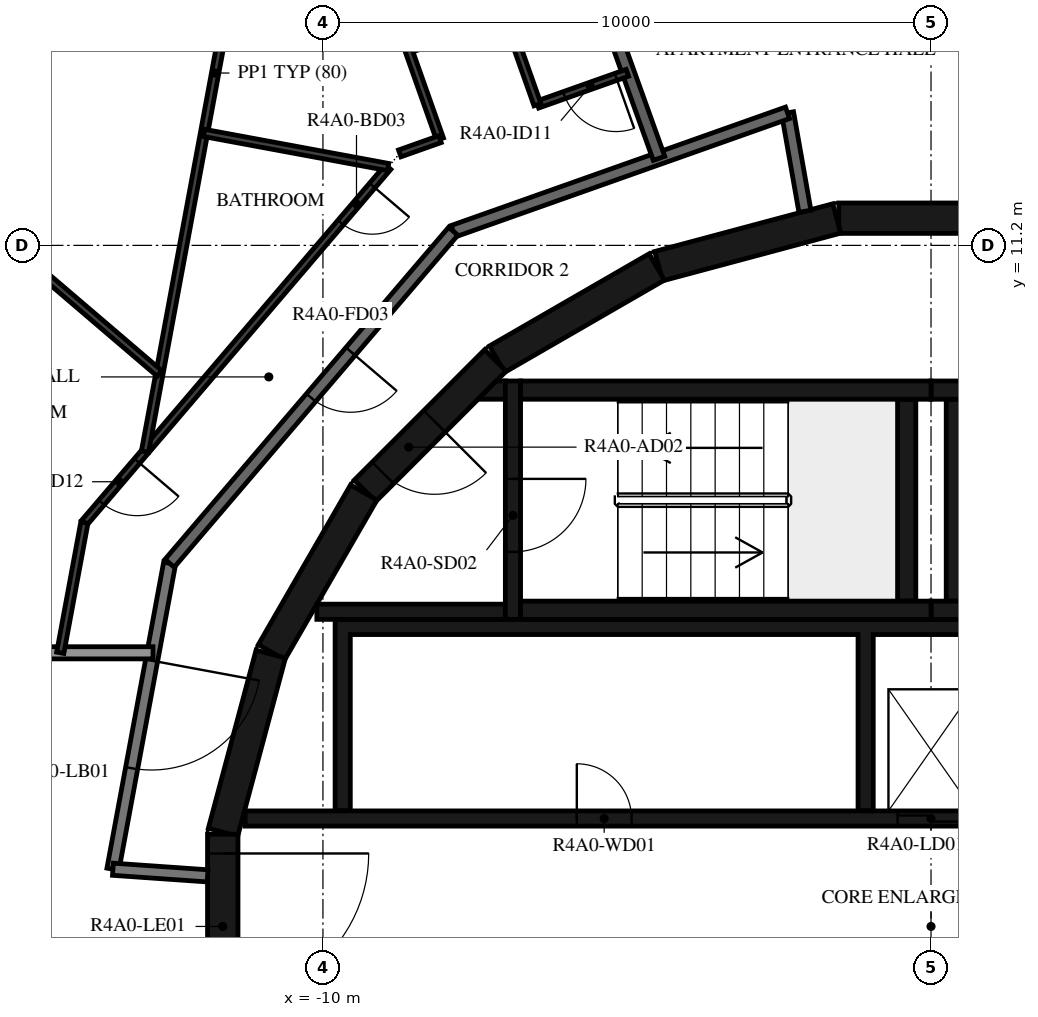
"""IFC4 building model, lengths in metres.
Left out: names, types, materials, properties, quantities, classifications, styles, units other than length and angle.
Written with IfcOpenShell. Run it as: python <this file> out.ifc"""

import sys

from ifc_helpers import new_model, si_unit, direction, frame, frame_2d, origin, place, context, subcontext, project, spatial, polyline, rectangle, outline, extrude, element, fill, save


model = new_model("IFC4")
c1 = context("Model", 3, precision=1e-05, world=origin(), true_north=direction((0.0, 1.0)))
c2 = subcontext(c1, "Body", "Model", "MODEL_VIEW")
j1 = project(units=[si_unit("LENGTHUNIT", "METRE"), si_unit("PLANEANGLEUNIT", "RADIAN")], contexts=[c1])
p1 = place(None, origin())
s1 = spatial("IfcSite", under=j1, at=p1, CompositionType="ELEMENT")
p2 = place(p1, origin())
s2 = spatial("IfcBuilding", under=s1, at=p2, CompositionType="ELEMENT")
p3 = place(p2, frame((0.0, 0.0, 158.7)))
s3 = spatial("IfcBuildingStorey", under=s2, at=p3, CompositionType="ELEMENT", Elevation=158.7)
for number, where, z_axis, x_axis in (
    (1, (1.516, 11.647, 0.0), (0.0, 0.0, 1.0), (-1.0, 0.0, 0.0)),
    (2, (-1.55, 11.643, 0.0), (0.0, 0.0, 1.0), (-0.966, -0.259, 0.0)),
    (3, (-4.51, 10.845, 0.0), (0.0, 0.0, 1.0), (-0.866, -0.5, 0.0)),
):
    element("IfcWall", number, at=place(p3, frame(where, z_axis=z_axis, x_axis=x_axis)), inside=s3, PredefinedType="SHEAR", context=c2, shape_type="SweptSolid", body=[
        extrude(rectangle(XDim=3.033, YDim=0.5, at=frame_2d((1.516, 0.0))), origin(), (0.0, 0.0, 1.0), 3.12),
    ])
p4 = place(p3, frame((-7.164, 9.308, 0.0), z_axis=(0.0, 0.0, 1.0), x_axis=(-0.707106781187, -0.707106781187, 0.0)))
e4 = element("IfcWall", 4, at=p4, inside=s3, PredefinedType="SHEAR", context=c2, shape_type="SweptSolid", body=[
    extrude(rectangle(XDim=3.032, YDim=0.5, at=frame_2d((1.516, 0.0))), origin(), (0.0, 0.0, 1.0), 3.12),
])
p5 = place(p4, frame((1.416, 0.0, 0.0)))
e5 = element("IfcOpeningElement", 5, at=p5, cuts=e4, PredefinedType="OPENING", context=c2, shape_type="SweptSolid", body=[
    extrude(rectangle(XDim=1.2, YDim=2.1, at=frame_2d((0.6, 1.05))), frame((0.0, 0.26, 0.0), z_axis=(0.0, -1.0, 0.0), x_axis=(1.0, 0.0, 0.0)), (0.0, 0.0, 1.0), 0.52),
])
for number, where, z_axis, x_axis in (
    (6, (-9.329, 7.137, 0.0), (0.0, 0.0, 1.0), (-0.5, -0.866, 0.0)),
    (7, (-10.858, 4.479, 0.0), (0.0, 0.0, 1.0), (-0.259, -0.966, 0.0)),
):
    element("IfcWall", number, at=place(p3, frame(where, z_axis=z_axis, x_axis=x_axis)), inside=s3, PredefinedType="SHEAR", context=c2, shape_type="SweptSolid", body=[
        extrude(rectangle(XDim=3.033, YDim=0.5, at=frame_2d((1.516, 0.0))), origin(), (0.0, 0.0, 1.0), 3.12),
    ])
p6 = place(p3, frame((-11.647, 1.516, 0.0), z_axis=(0.0, 0.0, 1.0), x_axis=(0.0, -1.0, 0.0)))
e8 = element("IfcWall", 8, at=p6, inside=s3, PredefinedType="SHEAR", context=c2, shape_type="SweptSolid", body=[
    extrude(rectangle(XDim=3.033, YDim=0.5, at=frame_2d((1.516, 0.0))), origin(), (0.0, 0.0, 1.0), 3.12),
])
p7 = place(p6, frame((0.316, 0.0, 0.0)))
e9 = element("IfcOpeningElement", 9, at=p7, cuts=e8, PredefinedType="OPENING", context=c2, shape_type="SweptSolid", body=[
    extrude(rectangle(XDim=2.4, YDim=2.1, at=frame_2d((1.2, 1.05))), frame((0.0, 0.26, 0.0), z_axis=(0.0, -1.0, 0.0), x_axis=(1.0, 0.0, 0.0)), (0.0, 0.0, 1.0), 0.52),
])
for number, where, z_axis, x_axis in (
    (10, (0.0, 5.2, 0.0), (0.0, 0.0, 1.0), (1.0, 0.0, 0.0)),
    (11, (0.0, 8.82, 0.0), (0.0, 0.0, 1.0), (1.0, 0.0, 0.0)),
):
    element("IfcWall", number, at=place(p3, frame(where, z_axis=z_axis, x_axis=x_axis)), inside=s3, PredefinedType="SHEAR", context=c2, shape_type="SweptSolid", body=[
        extrude(rectangle(XDim=6.75, YDim=0.3, at=frame_2d((3.375, 0.0))), origin(), (0.0, 0.0, 1.0), 3.12),
    ])
p8 = place(p3, frame((0.4, 5.35, 0.0), z_axis=(0.0, 0.0, 1.0), x_axis=(0.0, 1.0, 0.0)))
e12 = element("IfcWall", 12, at=p8, inside=s3, PredefinedType="SHEAR", context=c2, shape_type="SweptSolid", body=[
    extrude(rectangle(XDim=3.32, YDim=0.3, at=frame_2d((1.66, 0.0))), origin(), (0.0, 0.0, 1.0), 3.12),
])
for number, where, z_axis, x_axis in (
    (13, (-6.75, 5.2, 0.0), (0.0, 0.0, 1.0), (1.0, 0.0, 0.0)),
    (14, (-6.75, 8.82, 0.0), (0.0, 0.0, 1.0), (1.0, 0.0, 0.0)),
):
    element("IfcWall", number, at=place(p3, frame(where, z_axis=z_axis, x_axis=x_axis)), inside=s3, PredefinedType="SHEAR", context=c2, shape_type="SweptSolid", body=[
        extrude(rectangle(XDim=6.75, YDim=0.3, at=frame_2d((3.375, 0.0))), origin(), (0.0, 0.0, 1.0), 3.12),
    ])
p9 = place(p3, frame((-0.4, 5.35, 0.0), z_axis=(0.0, 0.0, 1.0), x_axis=(0.0, 1.0, 0.0)))
e15 = element("IfcWall", 15, at=p9, inside=s3, PredefinedType="SHEAR", context=c2, shape_type="SweptSolid", body=[
    extrude(rectangle(XDim=3.32, YDim=0.3, at=frame_2d((1.66, 0.0))), origin(), (0.0, 0.0, 1.0), 3.12),
])
p10 = place(p3, frame((-6.875, 8.97, 0.0), z_axis=(0.0, 0.0, 1.0), x_axis=(0.0, -1.0, 0.0)))
e16 = element("IfcWall", 16, at=p10, inside=s3, PredefinedType="SHEAR", context=c2, shape_type="SweptSolid", body=[
    extrude(rectangle(XDim=3.92, YDim=0.25, at=frame_2d((1.96, 0.0))), origin(), (0.0, 0.0, 1.0), 3.12),
])
p11 = place(p10, frame((1.61, 0.0, 0.0)))
e17 = element("IfcOpeningElement", 17, at=p11, cuts=e16, PredefinedType="OPENING", context=c2, shape_type="SweptSolid", body=[
    extrude(rectangle(XDim=1.2, YDim=2.1, at=frame_2d((0.6, 1.05))), frame((0.0, 0.135, 0.0), z_axis=(0.0, -1.0, 0.0), x_axis=(1.0, 0.0, 0.0)), (0.0, 0.0, 1.0), 0.27),
])
p12 = place(p3, frame((-7.0, 5.175, 0.0), z_axis=(0.0, 0.0, 1.0), x_axis=(-1.0, 0.0, 0.0)))
e18 = element("IfcWall", 18, at=p12, inside=s3, PredefinedType="SHEAR", context=c2, shape_type="SweptSolid", body=[
    extrude(rectangle(XDim=3.1, YDim=0.25, at=frame_2d((1.55, 0.0))), origin(), (0.0, 0.0, 1.0), 3.12),
])
p13 = place(p3, origin())
e19 = element("IfcWall", 19, at=p13, inside=s3, PredefinedType="SHEAR", context=c2, shape_type="SweptSolid", body=[
    extrude(outline(polyline([(-7.148, 8.97), (-7.0, 8.97), (-7.0, 8.67), (-7.448, 8.67), (-7.148, 8.97)])), origin(), (0.0, 0.0, 1.0), 3.12),
])
p14 = place(p3, origin())
e20 = element("IfcWall", 20, at=p14, inside=s3, PredefinedType="SHEAR", context=c2, shape_type="SweptSolid", body=[
    extrude(outline(polyline([(-9.55, 4.8), (-1.2, 4.8), (-1.2, 1.9), (-0.95, 1.9), (-0.95, 4.8), (0.95, 4.8), (0.95, 1.9), (1.2, 1.9), (1.2, 4.8), (3.1, 4.8), (3.1, 1.9), (3.35, 1.9), (3.35, 4.8), (5.25, 4.8), (5.25, 1.9), (5.5, 1.9), (5.5, 4.8), (7.4, 4.8), (7.4, 1.9), (7.65, 1.9), (7.65, 4.8), (9.55, 4.8), (9.55, 1.9), (9.8, 1.9), (9.8, 4.8), (9.8, 5.05), (-9.8, 5.05), (-9.8, 4.8), (-9.8, 1.9), (-9.55, 1.9), (-9.55, 4.8)])), origin(), (0.0, 0.0, 1.0), 3.12),
])
p15 = place(p3, frame((-11.28, 1.775, 0.0), z_axis=(0.0, 0.0, 1.0), x_axis=(1.0, 0.0, 0.0)))
e21 = element("IfcWall", 21, at=p15, inside=s3, PredefinedType="SHEAR", context=c2, shape_type="SweptSolid", body=[
    extrude(rectangle(XDim=14.38, YDim=0.25, at=frame_2d((7.19, 0.0))), origin(), (0.0, 0.0, 1.0), 3.12),
])
p16 = place(p15, frame((10.73, 0.0, 0.0)))
e22 = element("IfcOpeningElement", 22, at=p16, cuts=e21, PredefinedType="OPENING", context=c2, shape_type="SweptSolid", body=[
    extrude(rectangle(XDim=1.1, YDim=2.1, at=frame_2d((0.55, 1.05))), frame((0.0, 0.135, 0.0), z_axis=(0.0, -1.0, 0.0), x_axis=(1.0, 0.0, 0.0)), (0.0, 0.0, 1.0), 0.27),
])
p17 = place(p15, frame((12.88, 0.0, 0.0)))
e23 = element("IfcOpeningElement", 23, at=p17, cuts=e21, PredefinedType="OPENING", context=c2, shape_type="SweptSolid", body=[
    extrude(rectangle(XDim=1.1, YDim=2.1, at=frame_2d((0.55, 1.05))), frame((0.0, 0.135, 0.0), z_axis=(0.0, -1.0, 0.0), x_axis=(1.0, 0.0, 0.0)), (0.0, 0.0, 1.0), 0.27),
])
p18 = place(p15, frame((5.455, 0.0, 0.0)))
e24 = element("IfcOpeningElement", 24, at=p18, cuts=e21, PredefinedType="OPENING", context=c2, shape_type="SweptSolid", body=[
    extrude(rectangle(XDim=0.9, YDim=2.1, at=frame_2d((0.45, 1.05))), frame((0.0, 0.135, 0.0), z_axis=(0.0, -1.0, 0.0), x_axis=(1.0, 0.0, 0.0)), (0.0, 0.0, 1.0), 0.27),
])
p19 = place(p3, frame((-12.521, 5.972, 0.0), z_axis=(0.0, 0.0, 1.0), x_axis=(-0.182251559718, -0.983251935661, 0.0)))
e25 = element("IfcWall", 25, at=p19, inside=s3, PredefinedType="STANDARD", context=c2, shape_type="SweptSolid", body=[
    extrude(rectangle(XDim=5.117, YDim=0.2, at=frame_2d((2.559, 0.0))), origin(), (0.0, 0.0, 1.0), 3.12),
])
p20 = place(p19, frame((1.627, 0.0, 0.0)))
e26 = element("IfcOpeningElement", 26, at=p20, cuts=e25, PredefinedType="OPENING", context=c2, shape_type="SweptSolid", body=[
    extrude(rectangle(XDim=1.8, YDim=2.1, at=frame_2d((0.9, 1.05))), frame((0.0, 0.11, 0.0), z_axis=(0.0, -1.0, 0.0), x_axis=(1.0, 0.0, 0.0)), (0.0, 0.0, 1.0), 0.22),
])
p21 = place(p3, frame((-13.454, 0.941, 0.0), z_axis=(0.0, 0.0, 1.0), x_axis=(0.99755155062, -0.069934997354, 0.0)))
e27 = element("IfcWall", 27, at=p21, inside=s3, PredefinedType="STANDARD", context=c2, shape_type="SweptSolid", body=[
    extrude(rectangle(XDim=1.561, YDim=0.2, at=frame_2d((0.78, 0.0))), origin(), (0.0, 0.0, 1.0), 3.12),
])
p22 = place(p3, frame((-2.074, 11.761, 0.0), z_axis=(0.0, 0.0, 1.0), x_axis=(-0.1736412798, 0.984808969267, 0.0)))
e28 = element("IfcWall", 28, at=p22, inside=s3, PredefinedType="STANDARD", context=c2, shape_type="SweptSolid", body=[
    extrude(rectangle(XDim=1.644, YDim=0.2, at=frame_2d((0.822, 0.0))), origin(), (0.0, 0.0, 1.0), 3.12),
])
p23 = place(p3, frame((-2.359, 13.38, 0.0), z_axis=(0.0, 0.0, 1.0), x_axis=(-0.942647529236, -0.333789807551, 0.0)))
e29 = element("IfcWall", 29, at=p23, inside=s3, PredefinedType="STANDARD", context=c2, shape_type="SweptSolid", body=[
    extrude(rectangle(XDim=5.833, YDim=0.2, at=frame_2d((2.917, 0.0))), origin(), (0.0, 0.0, 1.0), 3.12),
])
p24 = place(p3, frame((-7.858, 11.433, 0.0), z_axis=(0.0, 0.0, 1.0), x_axis=(-0.649440801937, -0.760412154545, 0.0)))
e30 = element("IfcWall", 30, at=p24, inside=s3, PredefinedType="STANDARD", context=c2, shape_type="SweptSolid", body=[
    extrude(rectangle(XDim=7.181, YDim=0.2, at=frame_2d((3.59, 0.0))), origin(), (0.0, 0.0, 1.0), 3.12),
])
p25 = place(p24, frame((2.6, 0.0, 0.0)))
e31 = element("IfcOpeningElement", 31, at=p25, cuts=e30, PredefinedType="OPENING", context=c2, shape_type="SweptSolid", body=[
    extrude(rectangle(XDim=1.0, YDim=2.1, at=frame_2d((0.5, 1.05))), frame((0.0, 0.11, 0.0), z_axis=(0.0, -1.0, 0.0), x_axis=(1.0, 0.0, 0.0)), (0.0, 0.0, 1.0), 0.22),
])
p26 = place(p3, frame((-12.794, 4.5, 0.0), z_axis=(0.0, 0.0, 1.0), x_axis=(-1.0, 0.0, 0.0)))
e32 = element("IfcWall", 32, at=p26, inside=s3, PredefinedType="STANDARD", context=c2, shape_type="SweptSolid", body=[
    extrude(rectangle(XDim=5.106, YDim=0.2, at=frame_2d((2.553, 0.0))), origin(), (0.0, 0.0, 1.0), 2.73),
])
p27 = place(p3, frame((-6.185, 17.402, 0.0), z_axis=(0.0, 0.0, 1.0), x_axis=(0.337736730281, -0.941240618024, 0.0)))
e33 = element("IfcWall", 33, at=p27, inside=s3, PredefinedType="STANDARD", context=c2, shape_type="SweptSolid", body=[
    extrude(rectangle(XDim=5.068, YDim=0.2, at=frame_2d((2.534, 0.0))), origin(), (0.0, 0.0, 1.0), 3.12),
])
p28 = place(p3, frame((8.702, 12.206, 0.0), z_axis=(0.0, 0.0, 1.0), x_axis=(-0.760401313718, 0.649453494945, 0.0)))
e34 = element("IfcWall", 34, at=p28, inside=s3, PredefinedType="PARTITIONING", context=c2, shape_type="SweptSolid", body=[
    extrude(rectangle(XDim=16.724, YDim=0.12, at=frame_2d((8.362, 0.0))), origin(), (0.0, 0.0, 1.0), 3.12),
])
p29 = place(p28, frame((0.2, 0.0, 0.0)))
e35 = element("IfcOpeningElement", 35, at=p29, cuts=e34, PredefinedType="OPENING", context=c2, shape_type="SweptSolid", body=[
    extrude(rectangle(XDim=0.9, YDim=2.1, at=frame_2d((0.45, 1.05))), frame((0.0, 0.07, 0.0), z_axis=(0.0, -1.0, 0.0), x_axis=(1.0, 0.0, 0.0)), (0.0, 0.0, 1.0), 0.14),
])
p30 = place(p28, frame((7.099, 0.0, 0.0)))
e36 = element("IfcOpeningElement", 36, at=p30, cuts=e34, PredefinedType="OPENING", context=c2, shape_type="SweptSolid", body=[
    extrude(rectangle(XDim=0.9, YDim=2.1, at=frame_2d((0.45, 1.05))), frame((0.0, 0.07, 0.0), z_axis=(0.0, -1.0, 0.0), x_axis=(1.0, 0.0, 0.0)), (0.0, 0.0, 1.0), 0.14),
])
p31 = place(p3, frame((6.641, 13.923, 0.0), z_axis=(0.0, 0.0, 1.0), x_axis=(-0.983250157272, 0.182261153912, 0.0)))
e37 = element("IfcWall", 37, at=p31, inside=s3, PredefinedType="PARTITIONING", context=c2, shape_type="SweptSolid", body=[
    extrude(rectangle(XDim=7.985, YDim=0.12, at=frame_2d((3.992, 0.0))), origin(), (0.0, 0.0, 1.0), 3.12),
])
p32 = place(p31, frame((1.4, 0.0, 0.0)))
e38 = element("IfcOpeningElement", 38, at=p32, cuts=e37, PredefinedType="OPENING", context=c2, shape_type="SweptSolid", body=[
    extrude(rectangle(XDim=0.8, YDim=2.1, at=frame_2d((0.4, 1.05))), frame((0.0, 0.07, 0.0), z_axis=(0.0, -1.0, 0.0), x_axis=(1.0, 0.0, 0.0)), (0.0, 0.0, 1.0), 0.14),
])
p33 = place(p31, frame((5.069, 0.0, 0.0)))
e39 = element("IfcOpeningElement", 39, at=p33, cuts=e37, PredefinedType="OPENING", context=c2, shape_type="SweptSolid", body=[
    extrude(rectangle(XDim=0.9, YDim=2.1, at=frame_2d((0.45, 1.05))), frame((0.0, 0.07, 0.0), z_axis=(0.0, -1.0, 0.0), x_axis=(1.0, 0.0, 0.0)), (0.0, 0.0, 1.0), 0.14),
])
p34 = place(p3, frame((-4.993, 14.038, 0.0), z_axis=(0.0, 0.0, 1.0), x_axis=(-0.942685371668, -0.333682918418, 0.0)))
e40 = element("IfcWall", 40, at=p34, inside=s3, PredefinedType="PARTITIONING", context=c2, shape_type="SweptSolid", body=[
    extrude(rectangle(XDim=1.569, YDim=0.12, at=frame_2d((0.784, 0.0))), origin(), (0.0, 0.0, 1.0), 3.12),
])
p35 = place(p34, frame((0.2, 0.0, 0.0)))
e41 = element("IfcOpeningElement", 41, at=p35, cuts=e40, PredefinedType="OPENING", context=c2, shape_type="SweptSolid", body=[
    extrude(rectangle(XDim=0.9, YDim=2.1, at=frame_2d((0.45, 1.05))), frame((0.0, 0.07, 0.0), z_axis=(0.0, -1.0, 0.0), x_axis=(1.0, 0.0, 0.0)), (0.0, 0.0, 1.0), 0.14),
])
p36 = place(p3, frame((-6.472, 13.515, 0.0), z_axis=(0.0, 0.0, 1.0), x_axis=(-0.333809516424, 0.942640550127, 0.0)))
e42 = element("IfcWall", 42, at=p36, inside=s3, PredefinedType="PARTITIONING", context=c2, shape_type="SweptSolid", body=[
    extrude(rectangle(XDim=1.562, YDim=0.12, at=frame_2d((0.781, 0.0))), origin(), (0.0, 0.0, 1.0), 3.12),
])
p37 = place(p3, frame((-6.993, 14.987, 0.0), z_axis=(0.0, 0.0, 1.0), x_axis=(-0.942599915297, -0.33392424243, 0.0)))
e43 = element("IfcWall", 43, at=p37, inside=s3, PredefinedType="PARTITIONING", context=c2, shape_type="SweptSolid", body=[
    extrude(rectangle(XDim=1.7, YDim=0.12, at=frame_2d((0.85, 0.0))), origin(), (0.0, 0.0, 1.0), 3.12),
])
p38 = place(p3, frame((-8.596, 14.419, 0.0), z_axis=(0.0, 0.0, 1.0), x_axis=(0.333670576497, -0.942689740254, 0.0)))
e44 = element("IfcWall", 44, at=p38, inside=s3, PredefinedType="PARTITIONING", context=c2, shape_type="SweptSolid", body=[
    extrude(rectangle(XDim=1.562, YDim=0.12, at=frame_2d((0.781, 0.0))), origin(), (0.0, 0.0, 1.0), 3.12),
])
p39 = place(p3, frame((-8.075, 12.947, 0.0), z_axis=(0.0, 0.0, 1.0), x_axis=(-0.942649994227, -0.33378284615, 0.0)))
e45 = element("IfcWall", 45, at=p39, inside=s3, PredefinedType="PARTITIONING", context=c2, shape_type="SweptSolid", body=[
    extrude(rectangle(XDim=0.703, YDim=0.12, at=frame_2d((0.352, 0.0))), origin(), (0.0, 0.0, 1.0), 3.12),
])
p40 = place(p3, frame((-8.929, 12.488, 0.0), z_axis=(0.0, 0.0, 1.0), x_axis=(-0.64944646045, -0.760407321775, 0.0)))
e46 = element("IfcWall", 46, at=p40, inside=s3, PredefinedType="PARTITIONING", context=c2, shape_type="SweptSolid", body=[
    extrude(rectangle(XDim=7.69, YDim=0.12, at=frame_2d((3.845, 0.0))), origin(), (0.0, 0.0, 1.0), 3.12),
])
p41 = place(p40, frame((0.4, 0.0, 0.0)))
e47 = element("IfcOpeningElement", 47, at=p41, cuts=e46, PredefinedType="OPENING", context=c2, shape_type="SweptSolid", body=[
    extrude(rectangle(XDim=0.8, YDim=2.1, at=frame_2d((0.4, 1.05))), frame((0.0, 0.07, 0.0), z_axis=(0.0, -1.0, 0.0), x_axis=(1.0, 0.0, 0.0)), (0.0, 0.0, 1.0), 0.14),
])
p42 = place(p40, frame((6.356, 0.0, 0.0)))
e48 = element("IfcOpeningElement", 48, at=p42, cuts=e46, PredefinedType="OPENING", context=c2, shape_type="SweptSolid", body=[
    extrude(rectangle(XDim=0.9, YDim=2.1, at=frame_2d((0.45, 1.05))), frame((0.0, 0.07, 0.0), z_axis=(0.0, -1.0, 0.0), x_axis=(1.0, 0.0, 0.0)), (0.0, 0.0, 1.0), 0.14),
])
p43 = place(p3, frame((-13.923, 6.641, 0.0), z_axis=(0.0, 0.0, 1.0), x_axis=(-0.182209715759, -0.983259690765, 0.0)))
e49 = element("IfcWall", 49, at=p43, inside=s3, PredefinedType="PARTITIONING", context=c2, shape_type="SweptSolid", body=[
    extrude(rectangle(XDim=2.177, YDim=0.12, at=frame_2d((1.089, 0.0))), origin(), (0.0, 0.0, 1.0), 3.12),
])
p44 = place(p3, frame((-10.618, 20.262, 0.0), z_axis=(0.0, 0.0, 1.0), x_axis=(-0.182222468274, -0.983257327487, 0.0)))
e50 = element("IfcWall", 50, at=p44, inside=s3, PredefinedType="PARTITIONING", context=c2, shape_type="SweptSolid", body=[
    extrude(rectangle(XDim=12.667, YDim=0.12, at=frame_2d((6.333, 0.0))), origin(), (0.0, 0.0, 1.0), 3.12),
])
p45 = place(p44, frame((2.57, 0.0, 0.0)))
e51 = element("IfcOpeningElement", 51, at=p45, cuts=e50, PredefinedType="OPENING", context=c2, shape_type="SweptSolid", body=[
    extrude(rectangle(XDim=0.9, YDim=2.1, at=frame_2d((0.45, 1.05))), frame((0.0, 0.07, 0.0), z_axis=(0.0, -1.0, 0.0), x_axis=(1.0, 0.0, 0.0)), (0.0, 0.0, 1.0), 0.14),
])
p46 = place(p3, frame((-11.955, 13.049, 0.0), z_axis=(0.0, 0.0, 1.0), x_axis=(0.983247271586, -0.182276720725, 0.0)))
e52 = element("IfcWall", 52, at=p46, inside=s3, PredefinedType="PARTITIONING", context=c2, shape_type="SweptSolid", body=[
    extrude(rectangle(XDim=3.078, YDim=0.12, at=frame_2d((1.539, 0.0))), origin(), (0.0, 0.0, 1.0), 3.12),
])
p47 = place(p3, frame((-16.552, 12.394, 0.0), z_axis=(0.0, 0.0, 1.0), x_axis=(0.760425586578, -0.649425074414, 0.0)))
e53 = element("IfcWall", 53, at=p47, inside=s3, PredefinedType="PARTITIONING", context=c2, shape_type="SweptSolid", body=[
    extrude(rectangle(XDim=5.081, YDim=0.12, at=frame_2d((2.541, 0.0))), origin(), (0.0, 0.0, 1.0), 3.12),
])
p48 = place(p11, origin())
e54 = element("IfcDoor", 54, at=p48, inside=s3, OperationType="SINGLE_SWING_LEFT", PredefinedType="DOOR", context=c2, shape_type="SweptSolid", body=[
    extrude(rectangle(XDim=1.2, YDim=2.1, at=frame_2d((0.6, 1.05))), frame((0.0, 0.025, 0.0), z_axis=(0.0, -1.0, 0.0), x_axis=(1.0, 0.0, 0.0)), (0.0, 0.0, 1.0), 0.05),
])
fill(e17, e54)
p49 = place(p5, origin())
e55 = element("IfcDoor", 55, at=p49, inside=s3, OperationType="SINGLE_SWING_RIGHT", PredefinedType="DOOR", context=c2, shape_type="SweptSolid", body=[
    extrude(rectangle(XDim=1.2, YDim=2.1, at=frame_2d((0.6, 1.05))), frame((0.0, 0.025, 0.0), z_axis=(0.0, -1.0, 0.0), x_axis=(1.0, 0.0, 0.0)), (0.0, 0.0, 1.0), 0.05),
])
fill(e5, e55)
p50 = place(p7, origin())
e56 = element("IfcDoor", 56, at=p50, inside=s3, OperationType="DOUBLE_DOOR_SINGLE_SWING", PredefinedType="DOOR", context=c2, shape_type="SweptSolid", body=[
    extrude(rectangle(XDim=2.4, YDim=2.1, at=frame_2d((1.2, 1.05))), frame((0.0, 0.025, 0.0), z_axis=(0.0, -1.0, 0.0), x_axis=(1.0, 0.0, 0.0)), (0.0, 0.0, 1.0), 0.05),
])
fill(e9, e56)
p51 = place(p16, origin())
e57 = element("IfcDoor", 57, at=p51, inside=s3, OperationType="DOUBLE_DOOR_SLIDING", PredefinedType="DOOR", context=c2, shape_type="SweptSolid", body=[
    extrude(rectangle(XDim=1.1, YDim=2.1, at=frame_2d((0.55, 1.05))), frame((0.0, 0.025, 0.0), z_axis=(0.0, -1.0, 0.0), x_axis=(1.0, 0.0, 0.0)), (0.0, 0.0, 1.0), 0.05),
])
fill(e22, e57)
p52 = place(p18, origin())
e58 = element("IfcDoor", 58, at=p52, inside=s3, OperationType="SINGLE_SWING_LEFT", PredefinedType="DOOR", context=c2, shape_type="SweptSolid", body=[
    extrude(rectangle(XDim=0.9, YDim=2.1, at=frame_2d((0.45, 1.05))), frame((0.0, 0.025, 0.0), z_axis=(0.0, -1.0, 0.0), x_axis=(1.0, 0.0, 0.0)), (0.0, 0.0, 1.0), 0.05),
])
fill(e24, e58)
p53 = place(p25, origin())
e59 = element("IfcDoor", 59, at=p53, inside=s3, OperationType="SINGLE_SWING_LEFT", PredefinedType="DOOR", context=c2, shape_type="SweptSolid", body=[
    extrude(rectangle(XDim=1.0, YDim=2.1, at=frame_2d((0.5, 1.05))), frame((0.0, 0.025, 0.0), z_axis=(0.0, -1.0, 0.0), x_axis=(1.0, 0.0, 0.0)), (0.0, 0.0, 1.0), 0.05),
])
fill(e31, e59)
p54 = place(p35, origin())
e60 = element("IfcDoor", 60, at=p54, inside=s3, OperationType="SINGLE_SWING_LEFT", PredefinedType="DOOR", context=c2, shape_type="SweptSolid", body=[
    extrude(rectangle(XDim=0.9, YDim=2.1, at=frame_2d((0.45, 1.05))), frame((0.0, 0.025, 0.0), z_axis=(0.0, -1.0, 0.0), x_axis=(1.0, 0.0, 0.0)), (0.0, 0.0, 1.0), 0.05),
])
fill(e41, e60)
p55 = place(p41, origin())
e61 = element("IfcDoor", 61, at=p55, inside=s3, OperationType="SINGLE_SWING_LEFT", PredefinedType="DOOR", context=c2, shape_type="SweptSolid", body=[
    extrude(rectangle(XDim=0.8, YDim=2.1, at=frame_2d((0.4, 1.05))), frame((0.0, 0.025, 0.0), z_axis=(0.0, -1.0, 0.0), x_axis=(1.0, 0.0, 0.0)), (0.0, 0.0, 1.0), 0.05),
])
fill(e47, e61)
p56 = place(p42, origin())
e62 = element("IfcDoor", 62, at=p56, inside=s3, OperationType="SINGLE_SWING_LEFT", PredefinedType="DOOR", context=c2, shape_type="SweptSolid", body=[
    extrude(rectangle(XDim=0.9, YDim=2.1, at=frame_2d((0.45, 1.05))), frame((0.0, 0.025, 0.0), z_axis=(0.0, -1.0, 0.0), x_axis=(1.0, 0.0, 0.0)), (0.0, 0.0, 1.0), 0.05),
])
fill(e48, e62)
p57 = place(p20, origin())
e63 = element("IfcDoor", 63, at=p57, inside=s3, OperationType="DOUBLE_DOOR_SINGLE_SWING", PredefinedType="DOOR", context=c2, shape_type="SweptSolid", body=[
    extrude(rectangle(XDim=1.8, YDim=2.1, at=frame_2d((0.9, 1.05))), frame((0.0, 0.025, 0.0), z_axis=(0.0, -1.0, 0.0), x_axis=(1.0, 0.0, 0.0)), (0.0, 0.0, 1.0), 0.05),
])
fill(e26, e63)
save(model, sys.argv[1])
